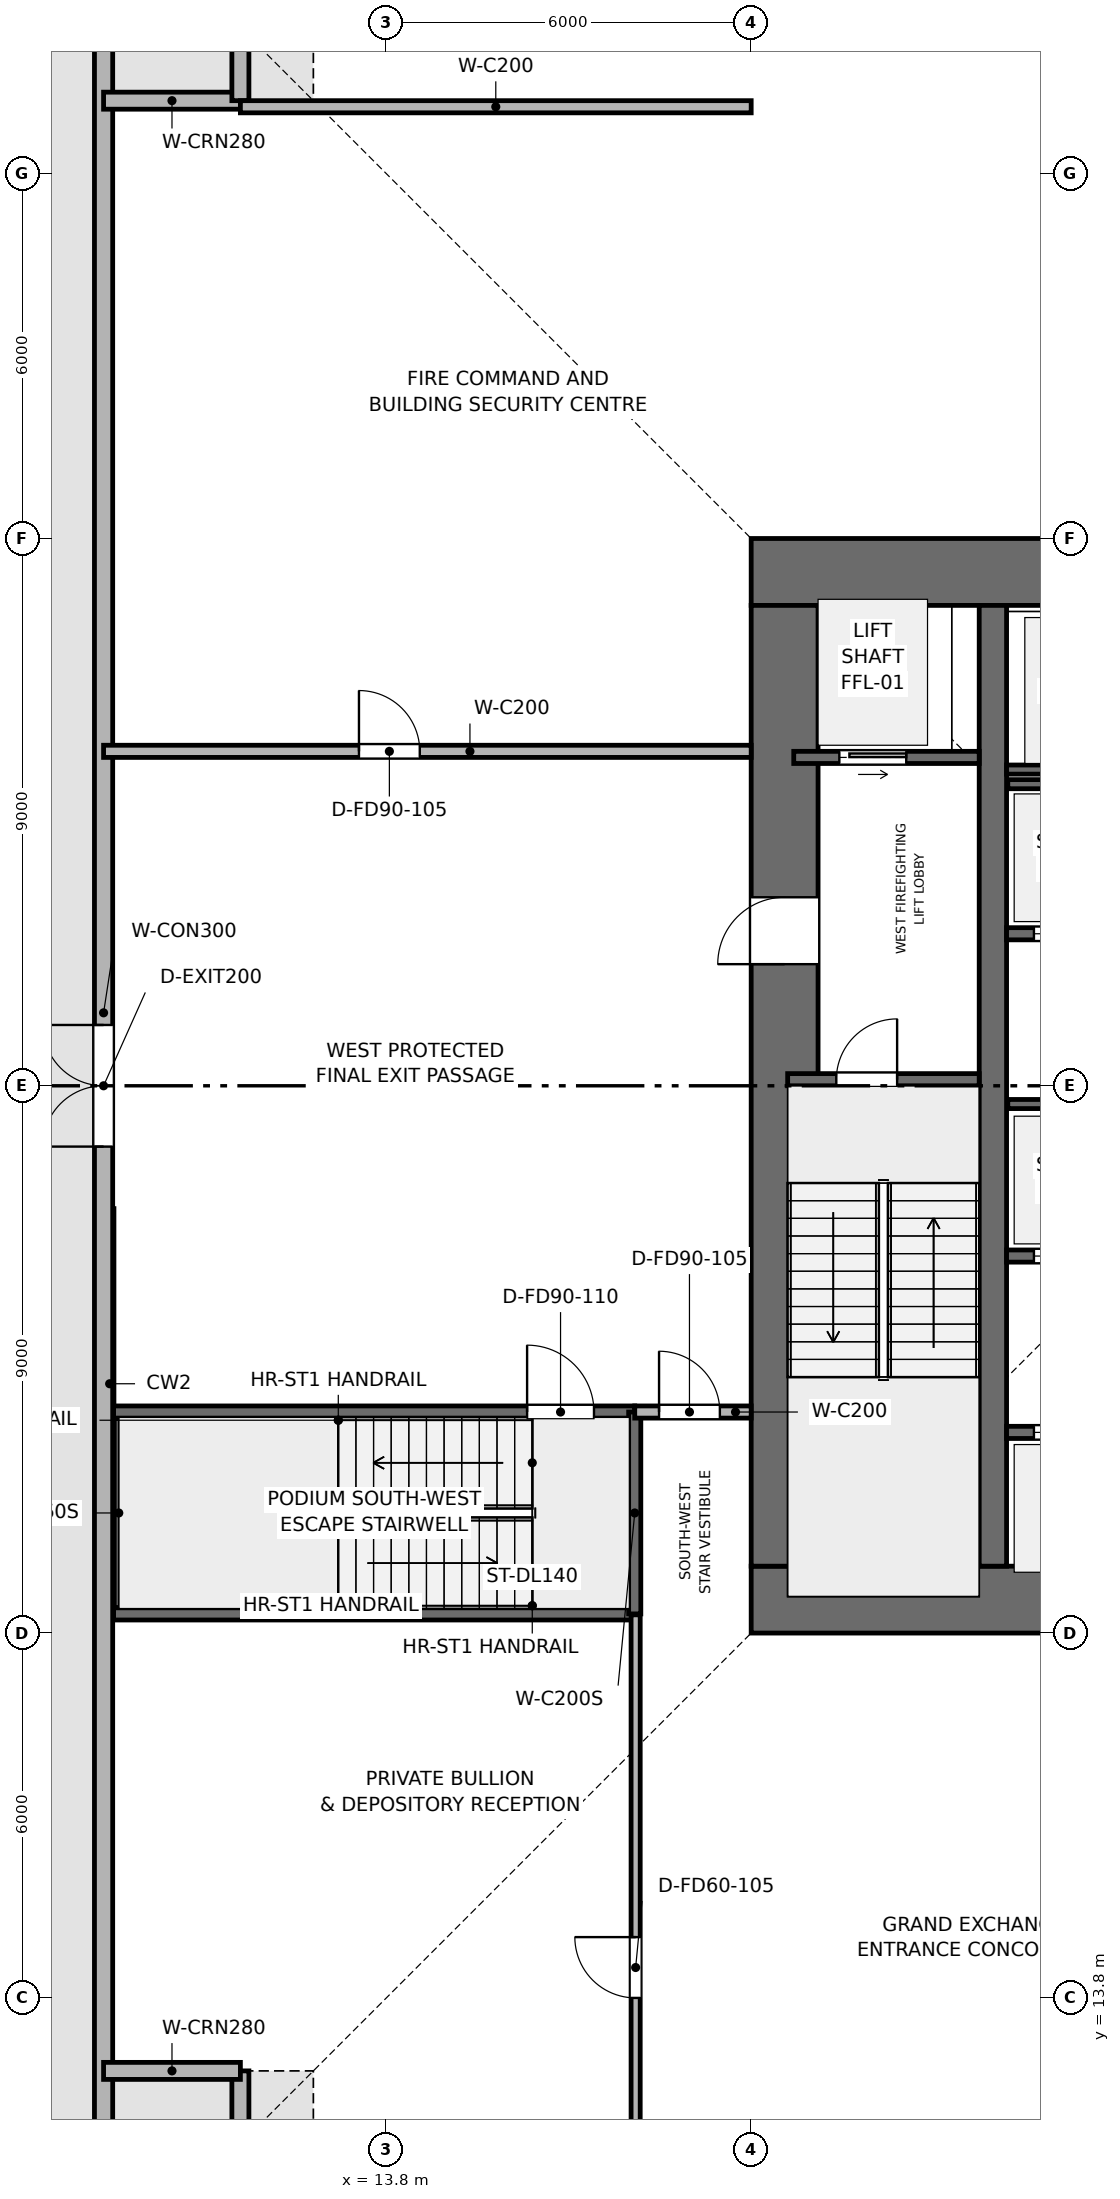
"""IFC4 building model, lengths in metres.
Left out: names, types, materials, properties, quantities, classifications, styles, units other than length and angle.
Written with IfcOpenShell. Run it as: python <this file> out.ifc"""

import sys

from ifc_helpers import new_model, si_unit, direction, frame, frame_2d, origin, place, context, subcontext, project, spatial, rectangle, extrude, element, fill, save


model = new_model("IFC4")
c1 = context("Model", 3, precision=1e-05, world=origin(), true_north=direction((0.0, 1.0)))
c2 = subcontext(c1, "Body", "Model", "MODEL_VIEW")
j1 = project(units=[si_unit("LENGTHUNIT", "METRE"), si_unit("PLANEANGLEUNIT", "RADIAN")], contexts=[c1])
p1 = place(None, origin())
s1 = spatial("IfcSite", under=j1, at=p1, CompositionType="ELEMENT")
p2 = place(p1, origin())
s2 = spatial("IfcBuilding", under=s1, at=p2, CompositionType="ELEMENT")
p3 = place(p2, origin())
s3 = spatial("IfcBuildingStorey", under=s2, at=p3, CompositionType="ELEMENT", Elevation=0.0)
p4 = place(p3, frame((19.8, 20.35, 0.0), z_axis=(0.0, 0.0, 1.0), x_axis=(1.0, 0.0, 0.0)))
e1 = element("IfcWall", 1, at=p4, inside=s3, PredefinedType="SHEAR", context=c2, shape_type="SweptSolid", body=[
    extrude(rectangle(XDim=18.0, YDim=1.1, at=frame_2d((9.0, 0.0))), origin(), (0.0, 0.0, 1.0), 8.4),
])
p5 = place(p4, frame((8.4, 0.0, 0.0)))
e2 = element("IfcOpeningElement", 2, at=p5, cuts=e1, PredefinedType="OPENING", context=c2, shape_type="SweptSolid", body=[
    extrude(rectangle(XDim=1.2, YDim=2.2, at=frame_2d((0.6, 1.1))), frame((0.0, 0.56, 0.0), z_axis=(0.0, -1.0, 0.0), x_axis=(1.0, 0.0, 0.0)), (0.0, 0.0, 1.0), 1.12),
])
p6 = place(p3, frame((19.8, 37.25, 0.0), z_axis=(0.0, 0.0, 1.0), x_axis=(1.0, 0.0, 0.0)))
e3 = element("IfcWall", 3, at=p6, inside=s3, PredefinedType="SHEAR", context=c2, shape_type="SweptSolid", body=[
    extrude(rectangle(XDim=18.0, YDim=1.1, at=frame_2d((9.0, 0.0))), origin(), (0.0, 0.0, 1.0), 8.4),
])
p7 = place(p6, frame((7.05, 0.0, 0.0)))
e4 = element("IfcOpeningElement", 4, at=p7, cuts=e3, PredefinedType="OPENING", context=c2, shape_type="SweptSolid", body=[
    extrude(rectangle(XDim=1.1, YDim=2.15, at=frame_2d((0.55, 1.075))), frame((0.0, 0.56, 0.0), z_axis=(0.0, -1.0, 0.0), x_axis=(1.0, 0.0, 0.0)), (0.0, 0.0, 1.0), 1.12),
])
p8 = place(p3, frame((20.35, 20.9, 0.0), z_axis=(0.0, 0.0, 1.0), x_axis=(0.0, 1.0, 0.0)))
e5 = element("IfcWall", 5, at=p8, inside=s3, PredefinedType="SHEAR", context=c2, shape_type="SweptSolid", body=[
    extrude(rectangle(XDim=15.8, YDim=1.1, at=frame_2d((7.9, 0.0))), origin(), (0.0, 0.0, 1.0), 8.4),
])
p9 = place(p8, frame((9.9, 0.0, 0.0)))
e6 = element("IfcOpeningElement", 6, at=p9, cuts=e5, PredefinedType="OPENING", context=c2, shape_type="SweptSolid", body=[
    extrude(rectangle(XDim=1.1, YDim=2.15, at=frame_2d((0.55, 1.075))), frame((0.0, 0.56, 0.0), z_axis=(0.0, -1.0, 0.0), x_axis=(1.0, 0.0, 0.0)), (0.0, 0.0, 1.0), 1.12),
])
p10 = place(p3, frame((23.775, 20.9, 0.0), z_axis=(0.0, 0.0, 1.0), x_axis=(0.0, 1.0, 0.0)))
e7 = element("IfcWall", 7, at=p10, inside=s3, PredefinedType="SHEAR", context=c2, shape_type="SweptSolid", body=[
    extrude(rectangle(XDim=15.8, YDim=0.45, at=frame_2d((7.9, 0.0))), origin(), (0.0, 0.0, 1.0), 8.4),
])
p11 = place(p3, frame((9.15, 11.4, 0.0), z_axis=(0.0, 0.0, 1.0), x_axis=(0.0, 1.0, 0.0)))
e8 = element("IfcWall", 8, at=p11, inside=s3, PredefinedType="SOLIDWALL", context=c2, shape_type="SweptSolid", body=[
    extrude(rectangle(XDim=34.8, YDim=0.3, at=frame_2d((17.4, 0.0))), origin(), (0.0, 0.0, 1.0), 8.05),
])
p12 = place(p11, frame((16.4, 0.0, 0.0)))
e9 = element("IfcOpeningElement", 9, at=p12, cuts=e8, PredefinedType="OPENING", context=c2, shape_type="SweptSolid", body=[
    extrude(rectangle(XDim=2.0, YDim=2.4, at=frame_2d((1.0, 1.2))), frame((0.0, 0.16, 0.0), z_axis=(0.0, -1.0, 0.0), x_axis=(1.0, 0.0, 0.0)), (0.0, 0.0, 1.0), 0.32),
])
p13 = place(p3, frame((11.4, 9.15, 0.0), z_axis=(0.0, 0.0, 1.0), x_axis=(0.0, 1.0, 0.0)))
e10 = element("IfcWall", 10, at=p13, inside=s3, PredefinedType="SOLIDWALL", context=c2, shape_type="SweptSolid", body=[
    extrude(rectangle(XDim=3.45, YDim=0.28, at=frame_2d((1.725, 0.0))), origin(), (0.0, 0.0, 1.0), 8.05),
])
for number, where, z_axis, x_axis in (
    (11, (11.4, 12.6, 0.0), (0.0, 0.0, 1.0), (-1.0, 0.0, 0.0)),
    (12, (9.15, 45.0, 0.0), (0.0, 0.0, 1.0), (1.0, 0.0, 0.0)),
):
    element("IfcWall", number, at=place(p3, frame(where, z_axis=z_axis, x_axis=x_axis)), inside=s3, PredefinedType="SOLIDWALL", context=c2, shape_type="SweptSolid", body=[
        extrude(rectangle(XDim=2.25, YDim=0.28, at=frame_2d((1.125, 0.0))), origin(), (0.0, 0.0, 1.0), 8.05),
    ])
p14 = place(p3, frame((11.4, 45.0, 0.0), z_axis=(0.0, 0.0, 1.0), x_axis=(0.0, 1.0, 0.0)))
e13 = element("IfcWall", 13, at=p14, inside=s3, PredefinedType="SOLIDWALL", context=c2, shape_type="SweptSolid", body=[
    extrude(rectangle(XDim=3.45, YDim=0.28, at=frame_2d((1.725, 0.0))), origin(), (0.0, 0.0, 1.0), 8.05),
])
p15 = place(p3, frame((20.4, 28.9, 0.0), z_axis=(0.0, 0.0, 1.0), x_axis=(1.0, 0.0, 0.0)))
e14 = element("IfcWall", 14, at=p15, inside=s3, PredefinedType="SHEAR", context=c2, shape_type="SweptSolid", body=[
    extrude(rectangle(XDim=3.15, YDim=0.2, at=frame_2d((1.575, 0.0))), origin(), (0.0, 0.0, 1.0), 8.05),
])
p16 = place(p15, frame((0.8, 0.0, 0.0)))
e15 = element("IfcOpeningElement", 15, at=p16, cuts=e14, PredefinedType="OPENING", context=c2, shape_type="SweptSolid", body=[
    extrude(rectangle(XDim=1.0, YDim=2.1, at=frame_2d((0.5, 1.05))), frame((0.0, 0.11, 0.0), z_axis=(0.0, -1.0, 0.0), x_axis=(1.0, 0.0, 0.0)), (0.0, 0.0, 1.0), 0.22),
])
p17 = place(p3, frame((20.5, 34.2, 0.0), z_axis=(0.0, 0.0, 1.0), x_axis=(1.0, 0.0, 0.0)))
e16 = element("IfcWall", 16, at=p17, inside=s3, PredefinedType="SHEAR", context=c2, shape_type="SweptSolid", body=[
    extrude(rectangle(XDim=3.05, YDim=0.2, at=frame_2d((1.525, 0.0))), origin(), (0.0, 0.0, 1.0), 8.05),
])
p18 = place(p17, frame((0.75, 0.0, 0.0)))
e17 = element("IfcOpeningElement", 17, at=p18, cuts=e16, PredefinedType="OPENING", context=c2, shape_type="SweptSolid", body=[
    extrude(rectangle(XDim=1.1, YDim=2.15, at=frame_2d((0.55, 1.075))), frame((0.0, 0.11, 0.0), z_axis=(0.0, -1.0, 0.0), x_axis=(1.0, 0.0, 0.0)), (0.0, 0.0, 1.0), 0.22),
])
p19 = place(p3, frame((24.0, 34.0, 0.0), z_axis=(0.0, 0.0, 1.0), x_axis=(1.0, 0.0, 0.0)))
e18 = element("IfcWall", 18, at=p19, inside=s3, PredefinedType="SHEAR", context=c2, shape_type="SweptSolid", body=[
    extrude(rectangle(XDim=2.48, YDim=0.15, at=frame_2d((1.24, 0.0))), origin(), (0.0, 0.0, 1.0), 8.05),
])
p20 = place(p3, frame((24.0, 23.1, 0.0), z_axis=(0.0, 0.0, 1.0), x_axis=(1.0, 0.0, 0.0)))
e19 = element("IfcWall", 19, at=p20, inside=s3, PredefinedType="SHEAR", context=c2, shape_type="SweptSolid", body=[
    extrude(rectangle(XDim=2.0, YDim=0.2, at=frame_2d((1.0, 0.0))), origin(), (0.0, 0.0, 1.0), 8.05),
])
p21 = place(p20, frame((0.45, 0.0, 0.0)))
e20 = element("IfcOpeningElement", 20, at=p21, cuts=e19, PredefinedType="OPENING", context=c2, shape_type="SweptSolid", body=[
    extrude(rectangle(XDim=1.1, YDim=2.15, at=frame_2d((0.55, 1.075))), frame((0.0, 0.11, 0.0), z_axis=(0.0, -1.0, 0.0), x_axis=(1.0, 0.0, 0.0)), (0.0, 0.0, 1.0), 0.22),
])
p22 = place(p3, frame((24.0, 26.0, 0.0), z_axis=(0.0, 0.0, 1.0), x_axis=(1.0, 0.0, 0.0)))
e21 = element("IfcWall", 21, at=p22, inside=s3, PredefinedType="SHEAR", context=c2, shape_type="SweptSolid", body=[
    extrude(rectangle(XDim=2.0, YDim=0.2, at=frame_2d((1.0, 0.0))), origin(), (0.0, 0.0, 1.0), 8.05),
])
p23 = place(p22, frame((0.45, 0.0, 0.0)))
e22 = element("IfcOpeningElement", 22, at=p23, cuts=e21, PredefinedType="OPENING", context=c2, shape_type="SweptSolid", body=[
    extrude(rectangle(XDim=1.1, YDim=2.15, at=frame_2d((0.55, 1.075))), frame((0.0, 0.11, 0.0), z_axis=(0.0, -1.0, 0.0), x_axis=(1.0, 0.0, 0.0)), (0.0, 0.0, 1.0), 0.22),
])
p24 = place(p3, frame((24.0, 31.3, 0.0), z_axis=(0.0, 0.0, 1.0), x_axis=(1.0, 0.0, 0.0)))
e23 = element("IfcWall", 23, at=p24, inside=s3, PredefinedType="SHEAR", context=c2, shape_type="SweptSolid", body=[
    extrude(rectangle(XDim=2.0, YDim=0.2, at=frame_2d((1.0, 0.0))), origin(), (0.0, 0.0, 1.0), 8.05),
])
p25 = place(p24, frame((0.45, 0.0, 0.0)))
e24 = element("IfcOpeningElement", 24, at=p25, cuts=e23, PredefinedType="OPENING", context=c2, shape_type="SweptSolid", body=[
    extrude(rectangle(XDim=1.1, YDim=2.15, at=frame_2d((0.55, 1.075))), frame((0.0, 0.11, 0.0), z_axis=(0.0, -1.0, 0.0), x_axis=(1.0, 0.0, 0.0)), (0.0, 0.0, 1.0), 0.22),
])
for number, where, z_axis, x_axis in (
    (25, (24.02, 28.5, 0.0), (0.0, 0.0, 1.0), (1.0, 0.0, 0.0)),
    (26, (24.02, 33.76, 0.0), (0.0, 0.0, 1.0), (1.0, 0.0, 0.0)),
):
    element("IfcWall", number, at=place(p3, frame(where, z_axis=z_axis, x_axis=x_axis)), inside=s3, PredefinedType="SHEAR", context=c2, shape_type="SweptSolid", body=[
        extrude(rectangle(XDim=4.08, YDim=0.15, at=frame_2d((2.04, 0.0))), origin(), (0.0, 0.0, 1.0), 8.05),
    ])
p26 = place(p3, frame((9.315, 23.435, 0.0), z_axis=(0.0, 0.0, 1.0), x_axis=(1.0, 0.0, 0.0)))
e27 = element("IfcWall", 27, at=p26, inside=s3, PredefinedType="SHEAR", context=c2, shape_type="SweptSolid", body=[
    extrude(rectangle(XDim=8.57, YDim=0.2, at=frame_2d((4.285, 0.0))), origin(), (0.0, 0.0, 1.0), 8.398),
])
p27 = place(p26, frame((6.8, 0.0, 0.0)))
e28 = element("IfcOpeningElement", 28, at=p27, cuts=e27, PredefinedType="OPENING", context=c2, shape_type="SweptSolid", body=[
    extrude(rectangle(XDim=1.1, YDim=2.15, at=frame_2d((0.55, 1.075))), frame((0.0, 0.11, 0.0), z_axis=(0.0, -1.0, 0.0), x_axis=(1.0, 0.0, 0.0)), (0.0, 0.0, 1.0), 0.22),
])
p28 = place(p3, frame((9.315, 20.115, 0.0), z_axis=(0.0, 0.0, 1.0), x_axis=(1.0, 0.0, 0.0)))
e29 = element("IfcWall", 29, at=p28, inside=s3, PredefinedType="SHEAR", context=c2, shape_type="SweptSolid", body=[
    extrude(rectangle(XDim=8.57, YDim=0.2, at=frame_2d((4.285, 0.0))), origin(), (0.0, 0.0, 1.0), 8.398),
])
p29 = place(p3, frame((9.4, 20.22, 0.0), z_axis=(0.0, 0.0, 1.0), x_axis=(0.0, 1.0, 0.0)))
e30 = element("IfcWall", 30, at=p29, inside=s3, PredefinedType="SHEAR", context=c2, shape_type="SweptSolid", body=[
    extrude(rectangle(XDim=3.11, YDim=0.15, at=frame_2d((1.555, 0.0))), origin(), (0.0, 0.0, 1.0), 8.398),
])
p30 = place(p3, frame((17.885, 20.115, 0.0), z_axis=(0.0, 0.0, 1.0), x_axis=(0.0, 1.0, 0.0)))
e31 = element("IfcWall", 31, at=p30, inside=s3, PredefinedType="SHEAR", context=c2, shape_type="SweptSolid", body=[
    extrude(rectangle(XDim=3.32, YDim=0.2, at=frame_2d((1.66, 0.0))), origin(), (0.0, 0.0, 1.0), 8.398),
])
p31 = place(p3, frame((17.885, 23.435, 0.0), z_axis=(0.0, 0.0, 1.0), x_axis=(1.0, 0.0, 0.0)))
e32 = element("IfcWall", 32, at=p31, inside=s3, PredefinedType="PARTITIONING", context=c2, shape_type="SweptSolid", body=[
    extrude(rectangle(XDim=1.915, YDim=0.2, at=frame_2d((0.958, 0.0))), origin(), (0.0, 0.0, 1.0), 8.05),
])
p32 = place(p31, frame((0.4, 0.0, 0.0)))
e33 = element("IfcOpeningElement", 33, at=p32, cuts=e32, PredefinedType="OPENING", context=c2, shape_type="SweptSolid", body=[
    extrude(rectangle(XDim=1.0, YDim=2.15, at=frame_2d((0.5, 1.075))), frame((0.0, 0.11, 0.0), z_axis=(0.0, -1.0, 0.0), x_axis=(1.0, 0.0, 0.0)), (0.0, 0.0, 1.0), 0.22),
])
p33 = place(p3, frame((9.15, 34.3, 0.0), z_axis=(0.0, 0.0, 1.0), x_axis=(1.0, 0.0, 0.0)))
e34 = element("IfcWall", 34, at=p33, inside=s3, PredefinedType="PARTITIONING", context=c2, shape_type="SweptSolid", body=[
    extrude(rectangle(XDim=10.65, YDim=0.2, at=frame_2d((5.325, 0.0))), origin(), (0.0, 0.0, 1.0), 8.05),
])
p34 = place(p33, frame((4.2, 0.0, 0.0)))
e35 = element("IfcOpeningElement", 35, at=p34, cuts=e34, PredefinedType="OPENING", context=c2, shape_type="SweptSolid", body=[
    extrude(rectangle(XDim=1.0, YDim=2.15, at=frame_2d((0.5, 1.075))), frame((0.0, 0.11, 0.0), z_axis=(0.0, -1.0, 0.0), x_axis=(1.0, 0.0, 0.0)), (0.0, 0.0, 1.0), 0.22),
])
p35 = place(p3, frame((11.4, 44.9, 0.0), z_axis=(0.0, 0.0, 1.0), x_axis=(1.0, 0.0, 0.0)))
e36 = element("IfcWall", 36, at=p35, inside=s3, PredefinedType="PARTITIONING", context=c2, shape_type="SweptSolid", body=[
    extrude(rectangle(XDim=8.4, YDim=0.2, at=frame_2d((4.2, 0.0))), origin(), (0.0, 0.0, 1.0), 7.135),
])
p36 = place(p3, frame((17.9, 9.3, 0.0), z_axis=(0.0, 0.0, 1.0), x_axis=(0.0, 1.0, 0.0)))
e37 = element("IfcWall", 37, at=p36, inside=s3, PredefinedType="PARTITIONING", context=c2, shape_type="SweptSolid", body=[
    extrude(rectangle(XDim=10.8, YDim=0.15, at=frame_2d((5.4, 0.0))), origin(), (0.0, 0.0, 1.0), 7.135),
])
p37 = place(p36, frame((4.5, 0.0, 0.0)))
e38 = element("IfcOpeningElement", 38, at=p37, cuts=e37, PredefinedType="OPENING", context=c2, shape_type="SweptSolid", body=[
    extrude(rectangle(XDim=1.0, YDim=2.15, at=frame_2d((0.5, 1.075))), frame((0.0, 0.085, 0.0), z_axis=(0.0, -1.0, 0.0), x_axis=(1.0, 0.0, 0.0)), (0.0, 0.0, 1.0), 0.17),
])
p38 = place(p12, origin())
e39 = element("IfcDoor", 39, at=p38, inside=s3, OperationType="DOUBLE_DOOR_SINGLE_SWING", PredefinedType="DOOR", context=c2, shape_type="SweptSolid", body=[
    extrude(rectangle(XDim=2.0, YDim=2.4, at=frame_2d((1.0, 1.2))), frame((0.0, 0.025, 0.0), z_axis=(0.0, -1.0, 0.0), x_axis=(1.0, 0.0, 0.0)), (0.0, 0.0, 1.0), 0.05),
])
fill(e9, e39)
p39 = place(p16, origin())
e40 = element("IfcDoor", 40, at=p39, inside=s3, OperationType="SINGLE_SWING_RIGHT", PredefinedType="DOOR", context=c2, shape_type="SweptSolid", body=[
    extrude(rectangle(XDim=1.0, YDim=2.1, at=frame_2d((0.5, 1.05))), frame((0.0, 0.025, 0.0), z_axis=(0.0, -1.0, 0.0), x_axis=(1.0, 0.0, 0.0)), (0.0, 0.0, 1.0), 0.05),
])
fill(e15, e40)
p40 = place(p18, origin())
e41 = element("IfcDoor", 41, at=p40, inside=s3, OperationType="SLIDING_TO_RIGHT", PredefinedType="DOOR", context=c2, shape_type="SweptSolid", body=[
    extrude(rectangle(XDim=1.1, YDim=2.15, at=frame_2d((0.55, 1.075))), frame((0.0, 0.025, 0.0), z_axis=(0.0, -1.0, 0.0), x_axis=(1.0, 0.0, 0.0)), (0.0, 0.0, 1.0), 0.05),
])
fill(e17, e41)
p41 = place(p21, origin())
e42 = element("IfcDoor", 42, at=p41, inside=s3, OperationType="SLIDING_TO_RIGHT", PredefinedType="DOOR", context=c2, shape_type="SweptSolid", body=[
    extrude(rectangle(XDim=1.1, YDim=2.15, at=frame_2d((0.55, 1.075))), frame((0.0, 0.025, 0.0), z_axis=(0.0, -1.0, 0.0), x_axis=(1.0, 0.0, 0.0)), (0.0, 0.0, 1.0), 0.05),
])
fill(e20, e42)
p42 = place(p23, origin())
e43 = element("IfcDoor", 43, at=p42, inside=s3, OperationType="SLIDING_TO_RIGHT", PredefinedType="DOOR", context=c2, shape_type="SweptSolid", body=[
    extrude(rectangle(XDim=1.1, YDim=2.15, at=frame_2d((0.55, 1.075))), frame((0.0, 0.025, 0.0), z_axis=(0.0, -1.0, 0.0), x_axis=(1.0, 0.0, 0.0)), (0.0, 0.0, 1.0), 0.05),
])
fill(e22, e43)
p43 = place(p25, origin())
e44 = element("IfcDoor", 44, at=p43, inside=s3, OperationType="SLIDING_TO_RIGHT", PredefinedType="DOOR", context=c2, shape_type="SweptSolid", body=[
    extrude(rectangle(XDim=1.1, YDim=2.15, at=frame_2d((0.55, 1.075))), frame((0.0, 0.025, 0.0), z_axis=(0.0, -1.0, 0.0), x_axis=(1.0, 0.0, 0.0)), (0.0, 0.0, 1.0), 0.05),
])
fill(e24, e44)
p44 = place(p27, origin())
e45 = element("IfcDoor", 45, at=p44, inside=s3, OperationType="SINGLE_SWING_LEFT", PredefinedType="DOOR", context=c2, shape_type="SweptSolid", body=[
    extrude(rectangle(XDim=1.1, YDim=2.15, at=frame_2d((0.55, 1.075))), frame((0.0, 0.025, 0.0), z_axis=(0.0, -1.0, 0.0), x_axis=(1.0, 0.0, 0.0)), (0.0, 0.0, 1.0), 0.05),
])
fill(e28, e45)
p45 = place(p32, origin())
e46 = element("IfcDoor", 46, at=p45, inside=s3, OperationType="SINGLE_SWING_LEFT", PredefinedType="DOOR", context=c2, shape_type="SweptSolid", body=[
    extrude(rectangle(XDim=1.0, YDim=2.15, at=frame_2d((0.5, 1.075))), frame((0.0, 0.025, 0.0), z_axis=(0.0, -1.0, 0.0), x_axis=(1.0, 0.0, 0.0)), (0.0, 0.0, 1.0), 0.05),
])
fill(e33, e46)
p46 = place(p34, origin())
e47 = element("IfcDoor", 47, at=p46, inside=s3, OperationType="SINGLE_SWING_LEFT", PredefinedType="DOOR", context=c2, shape_type="SweptSolid", body=[
    extrude(rectangle(XDim=1.0, YDim=2.15, at=frame_2d((0.5, 1.075))), frame((0.0, 0.025, 0.0), z_axis=(0.0, -1.0, 0.0), x_axis=(1.0, 0.0, 0.0)), (0.0, 0.0, 1.0), 0.05),
])
fill(e35, e47)
p47 = place(p37, origin())
e48 = element("IfcDoor", 48, at=p47, inside=s3, OperationType="SINGLE_SWING_RIGHT", PredefinedType="DOOR", context=c2, shape_type="SweptSolid", body=[
    extrude(rectangle(XDim=1.0, YDim=2.15, at=frame_2d((0.5, 1.075))), frame((0.0, 0.025, 0.0), z_axis=(0.0, -1.0, 0.0), x_axis=(1.0, 0.0, 0.0)), (0.0, 0.0, 1.0), 0.05),
])
fill(e38, e48)
p48 = place(p9, origin())
e49 = element("IfcDoor", 49, at=p48, inside=s3, OperationType="SINGLE_SWING_LEFT", PredefinedType="DOOR", context=c2, shape_type="SweptSolid", body=[
    extrude(rectangle(XDim=1.1, YDim=2.15, at=frame_2d((0.55, 1.075))), frame((0.0, 0.025, 0.0), z_axis=(0.0, -1.0, 0.0), x_axis=(1.0, 0.0, 0.0)), (0.0, 0.0, 1.0), 0.05),
])
fill(e6, e49)
save(model, sys.argv[1])
